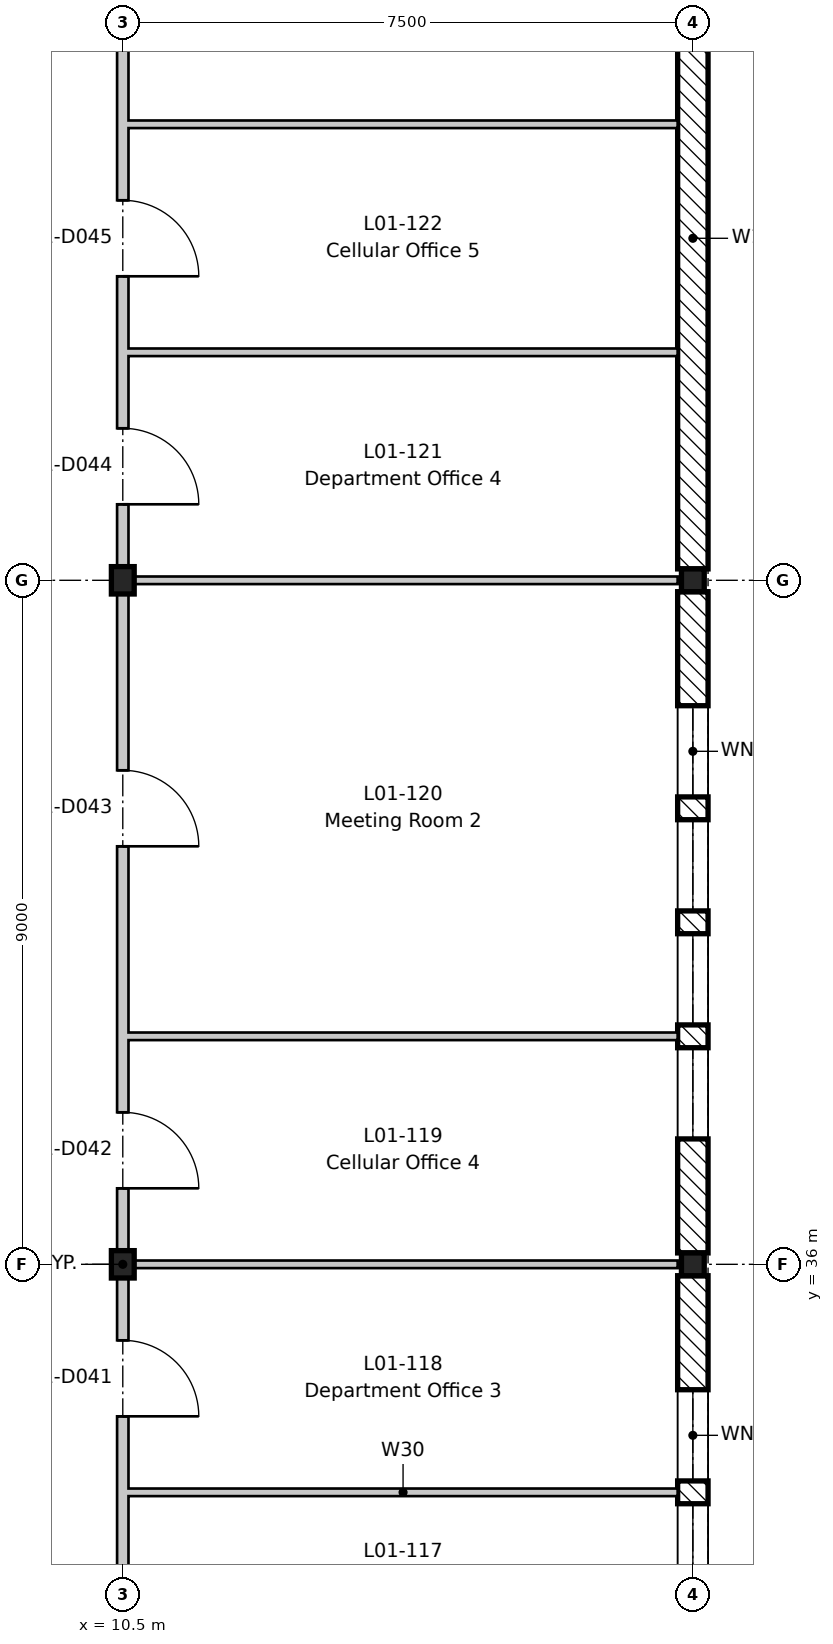
"""IFC4 building model, lengths in metres.
Left out: names, types, materials, properties, quantities, classifications, styles, units other than length and angle.
Written with IfcOpenShell. Run it as: python <this file> out.ifc"""

import sys

from ifc_helpers import new_model, si_unit, direction, frame, frame_2d, origin, origin_2d, place, context, subcontext, project, spatial, rectangle, i_section, extrude, element, fill, save


model = new_model("IFC4")
c1 = context("Model", 3, precision=1e-05, world=origin(), true_north=direction((0.0, 1.0)))
c2 = subcontext(c1, "Body", "Model", "MODEL_VIEW")
j1 = project(units=[si_unit("LENGTHUNIT", "METRE"), si_unit("PLANEANGLEUNIT", "RADIAN")], contexts=[c1])
p1 = place(None, origin())
s1 = spatial("IfcSite", under=j1, at=p1, CompositionType="ELEMENT")
p2 = place(p1, origin())
s2 = spatial("IfcBuilding", under=s1, at=p2, CompositionType="ELEMENT")
p3 = place(p2, frame((0.0, 0.0, 5.4)))
s3 = spatial("IfcBuildingStorey", under=s2, at=p3, CompositionType="ELEMENT", Elevation=5.4)
for number, where, z_axis, x_axis in (
    (1, (10.5, 36.0, -0.2), (0.0, 0.0, 1.0), (1.0, 0.0, 0.0)),
    (2, (10.5, 45.0, -0.2), (0.0, 0.0, 1.0), (1.0, 0.0, 0.0)),
):
    element("IfcColumn", number, at=place(p3, frame(where, z_axis=z_axis, x_axis=x_axis)), inside=s3, PredefinedType="COLUMN", context=c2, shape_type="SweptSolid", body=[
        extrude(i_section(OverallWidth=0.3, OverallDepth=0.36, WebThickness=0.012, FlangeThickness=0.022, FilletRadius=0.027, at=origin_2d()), origin(), (0.0, 0.0, 1.0), 4.5),
    ])
for number, where, z_axis, x_axis in (
    (3, (18.0, 36.0, -0.2), (0.0, 0.0, 1.0), (1.0, 0.0, 0.0)),
    (4, (18.0, 45.0, -0.2), (0.0, 0.0, 1.0), (1.0, 0.0, 0.0)),
):
    element("IfcColumn", number, at=place(p3, frame(where, z_axis=z_axis, x_axis=x_axis)), inside=s3, PredefinedType="COLUMN", context=c2, shape_type="SweptSolid", body=[
        extrude(i_section(OverallWidth=0.3, OverallDepth=0.3, WebThickness=0.011, FlangeThickness=0.019, FilletRadius=0.027, at=origin_2d()), origin(), (0.0, 0.0, 1.0), 4.5),
    ])
p4 = place(p3, frame((18.0, 35.85, 0.0), z_axis=(0.0, 0.0, 1.0), x_axis=(0.0, -1.0, 0.0)))
e5 = element("IfcWall", 5, at=p4, inside=s3, PredefinedType="STANDARD", context=c2, shape_type="SweptSolid", body=[
    extrude(rectangle(XDim=8.7, YDim=0.4, at=frame_2d((4.35, 0.0))), origin(), (0.0, 0.0, 1.0), 3.9),
])
p5 = place(p4, frame((6.0, 0.0, 0.6)))
e6 = element("IfcOpeningElement", 6, at=p5, cuts=e5, PredefinedType="OPENING", context=c2, shape_type="SweptSolid", body=[
    extrude(rectangle(XDim=1.2, YDim=3.0, at=frame_2d((0.6, 1.5))), frame((0.0, 0.21, 0.0), z_axis=(0.0, -1.0, 0.0), x_axis=(1.0, 0.0, 0.0)), (0.0, 0.0, 1.0), 0.42),
])
p6 = place(p4, frame((4.5, 0.0, 0.6)))
e7 = element("IfcOpeningElement", 7, at=p6, cuts=e5, PredefinedType="OPENING", context=c2, shape_type="SweptSolid", body=[
    extrude(rectangle(XDim=1.2, YDim=3.0, at=frame_2d((0.6, 1.5))), frame((0.0, 0.21, 0.0), z_axis=(0.0, -1.0, 0.0), x_axis=(1.0, 0.0, 0.0)), (0.0, 0.0, 1.0), 0.42),
])
p7 = place(p4, frame((3.0, 0.0, 0.6)))
e8 = element("IfcOpeningElement", 8, at=p7, cuts=e5, PredefinedType="OPENING", context=c2, shape_type="SweptSolid", body=[
    extrude(rectangle(XDim=1.2, YDim=3.0, at=frame_2d((0.6, 1.5))), frame((0.0, 0.21, 0.0), z_axis=(0.0, -1.0, 0.0), x_axis=(1.0, 0.0, 0.0)), (0.0, 0.0, 1.0), 0.42),
])
p8 = place(p4, frame((1.5, 0.0, 0.6)))
e9 = element("IfcOpeningElement", 9, at=p8, cuts=e5, PredefinedType="OPENING", context=c2, shape_type="SweptSolid", body=[
    extrude(rectangle(XDim=1.2, YDim=3.0, at=frame_2d((0.6, 1.5))), frame((0.0, 0.21, 0.0), z_axis=(0.0, -1.0, 0.0), x_axis=(1.0, 0.0, 0.0)), (0.0, 0.0, 1.0), 0.42),
])
p9 = place(p3, frame((18.0, 44.85, 0.0), z_axis=(0.0, 0.0, 1.0), x_axis=(0.0, -1.0, 0.0)))
e10 = element("IfcWall", 10, at=p9, inside=s3, PredefinedType="STANDARD", context=c2, shape_type="SweptSolid", body=[
    extrude(rectangle(XDim=8.7, YDim=0.4, at=frame_2d((4.35, 0.0))), origin(), (0.0, 0.0, 1.0), 3.9),
])
p10 = place(p9, frame((6.0, 0.0, 0.6)))
e11 = element("IfcOpeningElement", 11, at=p10, cuts=e10, PredefinedType="OPENING", context=c2, shape_type="SweptSolid", body=[
    extrude(rectangle(XDim=1.2, YDim=3.0, at=frame_2d((0.6, 1.5))), frame((0.0, 0.21, 0.0), z_axis=(0.0, -1.0, 0.0), x_axis=(1.0, 0.0, 0.0)), (0.0, 0.0, 1.0), 0.42),
])
p11 = place(p9, frame((4.5, 0.0, 0.6)))
e12 = element("IfcOpeningElement", 12, at=p11, cuts=e10, PredefinedType="OPENING", context=c2, shape_type="SweptSolid", body=[
    extrude(rectangle(XDim=1.2, YDim=3.0, at=frame_2d((0.6, 1.5))), frame((0.0, 0.21, 0.0), z_axis=(0.0, -1.0, 0.0), x_axis=(1.0, 0.0, 0.0)), (0.0, 0.0, 1.0), 0.42),
])
p12 = place(p9, frame((3.0, 0.0, 0.6)))
e13 = element("IfcOpeningElement", 13, at=p12, cuts=e10, PredefinedType="OPENING", context=c2, shape_type="SweptSolid", body=[
    extrude(rectangle(XDim=1.2, YDim=3.0, at=frame_2d((0.6, 1.5))), frame((0.0, 0.21, 0.0), z_axis=(0.0, -1.0, 0.0), x_axis=(1.0, 0.0, 0.0)), (0.0, 0.0, 1.0), 0.42),
])
p13 = place(p9, frame((1.5, 0.0, 0.6)))
e14 = element("IfcOpeningElement", 14, at=p13, cuts=e10, PredefinedType="OPENING", context=c2, shape_type="SweptSolid", body=[
    extrude(rectangle(XDim=1.2, YDim=3.0, at=frame_2d((0.6, 1.5))), frame((0.0, 0.21, 0.0), z_axis=(0.0, -1.0, 0.0), x_axis=(1.0, 0.0, 0.0)), (0.0, 0.0, 1.0), 0.42),
])
p14 = place(p3, frame((18.0, 53.85, 0.0), z_axis=(0.0, 0.0, 1.0), x_axis=(0.0, -1.0, 0.0)))
e15 = element("IfcWall", 15, at=p14, inside=s3, PredefinedType="STANDARD", context=c2, shape_type="SweptSolid", body=[
    extrude(rectangle(XDim=8.7, YDim=0.4, at=frame_2d((4.35, 0.0))), origin(), (0.0, 0.0, 1.0), 3.9),
])
p15 = place(p3, frame((10.575, 33.0, 0.0), z_axis=(0.0, 0.0, 1.0), x_axis=(1.0, 0.0, 0.0)))
e16 = element("IfcWall", 16, at=p15, inside=s3, PredefinedType="PARTITIONING", context=c2, shape_type="SweptSolid", body=[
    extrude(rectangle(XDim=7.225, YDim=0.1, at=frame_2d((3.613, 0.0))), origin(), (0.0, 0.0, 1.0), 4.3),
])
p16 = place(p3, frame((10.575, 36.0, 0.0), z_axis=(0.0, 0.0, 1.0), x_axis=(1.0, 0.0, 0.0)))
e17 = element("IfcWall", 17, at=p16, inside=s3, PredefinedType="PARTITIONING", context=c2, shape_type="SweptSolid", body=[
    extrude(rectangle(XDim=7.225, YDim=0.1, at=frame_2d((3.613, 0.0))), origin(), (0.0, 0.0, 1.0), 3.95),
])
p17 = place(p3, frame((10.575, 39.0, 0.0), z_axis=(0.0, 0.0, 1.0), x_axis=(1.0, 0.0, 0.0)))
e18 = element("IfcWall", 18, at=p17, inside=s3, PredefinedType="PARTITIONING", context=c2, shape_type="SweptSolid", body=[
    extrude(rectangle(XDim=7.225, YDim=0.1, at=frame_2d((3.613, 0.0))), origin(), (0.0, 0.0, 1.0), 4.3),
])
p18 = place(p3, frame((10.575, 45.0, 0.0), z_axis=(0.0, 0.0, 1.0), x_axis=(1.0, 0.0, 0.0)))
e19 = element("IfcWall", 19, at=p18, inside=s3, PredefinedType="PARTITIONING", context=c2, shape_type="SweptSolid", body=[
    extrude(rectangle(XDim=7.225, YDim=0.1, at=frame_2d((3.613, 0.0))), origin(), (0.0, 0.0, 1.0), 3.95),
])
for number, where, z_axis, x_axis in (
    (20, (10.575, 48.0, 0.0), (0.0, 0.0, 1.0), (1.0, 0.0, 0.0)),
    (21, (10.575, 51.0, 0.0), (0.0, 0.0, 1.0), (1.0, 0.0, 0.0)),
):
    element("IfcWall", number, at=place(p3, frame(where, z_axis=z_axis, x_axis=x_axis)), inside=s3, PredefinedType="PARTITIONING", context=c2, shape_type="SweptSolid", body=[
        extrude(rectangle(XDim=7.225, YDim=0.1, at=frame_2d((3.613, 0.0))), origin(), (0.0, 0.0, 1.0), 4.3),
    ])
p19 = place(p3, frame((10.5, -8.8, 0.0), z_axis=(0.0, 0.0, 1.0), x_axis=(0.0, 1.0, 0.0)))
e22 = element("IfcWall", 22, at=p19, inside=s3, PredefinedType="PARTITIONING", context=c2, shape_type="SweptSolid", body=[
    extrude(rectangle(XDim=79.3, YDim=0.15, at=frame_2d((39.65, 0.0))), origin(), (0.0, 0.0, 1.0), 3.78),
])
p20 = place(p19, frame((0.8, 0.0, 0.0)))
e23 = element("IfcOpeningElement", 23, at=p20, cuts=e22, PredefinedType="OPENING", context=c2, shape_type="SweptSolid", body=[
    extrude(rectangle(XDim=1.0, YDim=2.1, at=frame_2d((0.5, 1.05))), frame((0.0, 0.085, 0.0), z_axis=(0.0, -1.0, 0.0), x_axis=(1.0, 0.0, 0.0)), (0.0, 0.0, 1.0), 0.17),
])
p21 = place(p19, frame((5.3, 0.0, 0.0)))
e24 = element("IfcOpeningElement", 24, at=p21, cuts=e22, PredefinedType="OPENING", context=c2, shape_type="SweptSolid", body=[
    extrude(rectangle(XDim=1.0, YDim=2.1, at=frame_2d((0.5, 1.05))), frame((0.0, 0.085, 0.0), z_axis=(0.0, -1.0, 0.0), x_axis=(1.0, 0.0, 0.0)), (0.0, 0.0, 1.0), 0.17),
])
p22 = place(p19, frame((11.3, 0.0, 0.0)))
e25 = element("IfcOpeningElement", 25, at=p22, cuts=e22, PredefinedType="OPENING", context=c2, shape_type="SweptSolid", body=[
    extrude(rectangle(XDim=1.0, YDim=2.1, at=frame_2d((0.5, 1.05))), frame((0.0, 0.085, 0.0), z_axis=(0.0, -1.0, 0.0), x_axis=(1.0, 0.0, 0.0)), (0.0, 0.0, 1.0), 0.17),
])
p23 = place(p19, frame((15.8, 0.0, 0.0)))
e26 = element("IfcOpeningElement", 26, at=p23, cuts=e22, PredefinedType="OPENING", context=c2, shape_type="SweptSolid", body=[
    extrude(rectangle(XDim=1.0, YDim=2.1, at=frame_2d((0.5, 1.05))), frame((0.0, 0.085, 0.0), z_axis=(0.0, -1.0, 0.0), x_axis=(1.0, 0.0, 0.0)), (0.0, 0.0, 1.0), 0.17),
])
p24 = place(p19, frame((18.8, 0.0, 0.0)))
e27 = element("IfcOpeningElement", 27, at=p24, cuts=e22, PredefinedType="OPENING", context=c2, shape_type="SweptSolid", body=[
    extrude(rectangle(XDim=1.0, YDim=2.1, at=frame_2d((0.5, 1.05))), frame((0.0, 0.085, 0.0), z_axis=(0.0, -1.0, 0.0), x_axis=(1.0, 0.0, 0.0)), (0.0, 0.0, 1.0), 0.17),
])
p25 = place(p19, frame((23.3, 0.0, 0.0)))
e28 = element("IfcOpeningElement", 28, at=p25, cuts=e22, PredefinedType="OPENING", context=c2, shape_type="SweptSolid", body=[
    extrude(rectangle(XDim=1.0, YDim=2.1, at=frame_2d((0.5, 1.05))), frame((0.0, 0.085, 0.0), z_axis=(0.0, -1.0, 0.0), x_axis=(1.0, 0.0, 0.0)), (0.0, 0.0, 1.0), 0.17),
])
p26 = place(p19, frame((29.3, 0.0, 0.0)))
e29 = element("IfcOpeningElement", 29, at=p26, cuts=e22, PredefinedType="OPENING", context=c2, shape_type="SweptSolid", body=[
    extrude(rectangle(XDim=1.0, YDim=2.1, at=frame_2d((0.5, 1.05))), frame((0.0, 0.085, 0.0), z_axis=(0.0, -1.0, 0.0), x_axis=(1.0, 0.0, 0.0)), (0.0, 0.0, 1.0), 0.17),
])
p27 = place(p19, frame((33.8, 0.0, 0.0)))
e30 = element("IfcOpeningElement", 30, at=p27, cuts=e22, PredefinedType="OPENING", context=c2, shape_type="SweptSolid", body=[
    extrude(rectangle(XDim=1.0, YDim=2.1, at=frame_2d((0.5, 1.05))), frame((0.0, 0.085, 0.0), z_axis=(0.0, -1.0, 0.0), x_axis=(1.0, 0.0, 0.0)), (0.0, 0.0, 1.0), 0.17),
])
p28 = place(p19, frame((38.3, 0.0, 0.0)))
e31 = element("IfcOpeningElement", 31, at=p28, cuts=e22, PredefinedType="OPENING", context=c2, shape_type="SweptSolid", body=[
    extrude(rectangle(XDim=1.0, YDim=2.1, at=frame_2d((0.5, 1.05))), frame((0.0, 0.085, 0.0), z_axis=(0.0, -1.0, 0.0), x_axis=(1.0, 0.0, 0.0)), (0.0, 0.0, 1.0), 0.17),
])
p29 = place(p19, frame((42.8, 0.0, 0.0)))
e32 = element("IfcOpeningElement", 32, at=p29, cuts=e22, PredefinedType="OPENING", context=c2, shape_type="SweptSolid", body=[
    extrude(rectangle(XDim=1.0, YDim=2.1, at=frame_2d((0.5, 1.05))), frame((0.0, 0.085, 0.0), z_axis=(0.0, -1.0, 0.0), x_axis=(1.0, 0.0, 0.0)), (0.0, 0.0, 1.0), 0.17),
])
p30 = place(p19, frame((45.8, 0.0, 0.0)))
e33 = element("IfcOpeningElement", 33, at=p30, cuts=e22, PredefinedType="OPENING", context=c2, shape_type="SweptSolid", body=[
    extrude(rectangle(XDim=1.0, YDim=2.1, at=frame_2d((0.5, 1.05))), frame((0.0, 0.085, 0.0), z_axis=(0.0, -1.0, 0.0), x_axis=(1.0, 0.0, 0.0)), (0.0, 0.0, 1.0), 0.17),
])
p31 = place(p19, frame((50.3, 0.0, 0.0)))
e34 = element("IfcOpeningElement", 34, at=p31, cuts=e22, PredefinedType="OPENING", context=c2, shape_type="SweptSolid", body=[
    extrude(rectangle(XDim=1.0, YDim=2.1, at=frame_2d((0.5, 1.05))), frame((0.0, 0.085, 0.0), z_axis=(0.0, -1.0, 0.0), x_axis=(1.0, 0.0, 0.0)), (0.0, 0.0, 1.0), 0.17),
])
p32 = place(p19, frame((54.8, 0.0, 0.0)))
e35 = element("IfcOpeningElement", 35, at=p32, cuts=e22, PredefinedType="OPENING", context=c2, shape_type="SweptSolid", body=[
    extrude(rectangle(XDim=1.0, YDim=2.1, at=frame_2d((0.5, 1.05))), frame((0.0, 0.085, 0.0), z_axis=(0.0, -1.0, 0.0), x_axis=(1.0, 0.0, 0.0)), (0.0, 0.0, 1.0), 0.17),
])
p33 = place(p19, frame((57.8, 0.0, 0.0)))
e36 = element("IfcOpeningElement", 36, at=p33, cuts=e22, PredefinedType="OPENING", context=c2, shape_type="SweptSolid", body=[
    extrude(rectangle(XDim=1.0, YDim=2.1, at=frame_2d((0.5, 1.05))), frame((0.0, 0.085, 0.0), z_axis=(0.0, -1.0, 0.0), x_axis=(1.0, 0.0, 0.0)), (0.0, 0.0, 1.0), 0.17),
])
p34 = place(p19, frame((63.6, 0.0, 0.0)))
e37 = element("IfcOpeningElement", 37, at=p34, cuts=e22, PredefinedType="OPENING", context=c2, shape_type="SweptSolid", body=[
    extrude(rectangle(XDim=1.4, YDim=2.1, at=frame_2d((0.7, 1.05))), frame((0.0, 0.085, 0.0), z_axis=(0.0, -1.0, 0.0), x_axis=(1.0, 0.0, 0.0)), (0.0, 0.0, 1.0), 0.17),
])
p35 = place(p19, frame((69.8, 0.0, 0.0)))
e38 = element("IfcOpeningElement", 38, at=p35, cuts=e22, PredefinedType="OPENING", context=c2, shape_type="SweptSolid", body=[
    extrude(rectangle(XDim=1.0, YDim=2.1, at=frame_2d((0.5, 1.05))), frame((0.0, 0.085, 0.0), z_axis=(0.0, -1.0, 0.0), x_axis=(1.0, 0.0, 0.0)), (0.0, 0.0, 1.0), 0.17),
])
p36 = place(p19, frame((72.8, 0.0, 0.0)))
e39 = element("IfcOpeningElement", 39, at=p36, cuts=e22, PredefinedType="OPENING", context=c2, shape_type="SweptSolid", body=[
    extrude(rectangle(XDim=1.0, YDim=2.1, at=frame_2d((0.5, 1.05))), frame((0.0, 0.085, 0.0), z_axis=(0.0, -1.0, 0.0), x_axis=(1.0, 0.0, 0.0)), (0.0, 0.0, 1.0), 0.17),
])
p37 = place(p7, origin())
e40 = element("IfcWindow", 40, at=p37, inside=s3, PartitioningType="SINGLE_PANEL", PredefinedType="WINDOW", context=c2, shape_type="SweptSolid", body=[
    extrude(rectangle(XDim=1.2, YDim=3.0, at=frame_2d((0.6, 1.5))), frame((0.0, 0.03, 0.0), z_axis=(0.0, -1.0, 0.0), x_axis=(1.0, 0.0, 0.0)), (0.0, 0.0, 1.0), 0.06),
])
fill(e8, e40)
p38 = place(p8, origin())
e41 = element("IfcWindow", 41, at=p38, inside=s3, PartitioningType="SINGLE_PANEL", PredefinedType="WINDOW", context=c2, shape_type="SweptSolid", body=[
    extrude(rectangle(XDim=1.2, YDim=3.0, at=frame_2d((0.6, 1.5))), frame((0.0, 0.03, 0.0), z_axis=(0.0, -1.0, 0.0), x_axis=(1.0, 0.0, 0.0)), (0.0, 0.0, 1.0), 0.06),
])
fill(e9, e41)
p39 = place(p10, origin())
e42 = element("IfcWindow", 42, at=p39, inside=s3, PartitioningType="SINGLE_PANEL", PredefinedType="WINDOW", context=c2, shape_type="SweptSolid", body=[
    extrude(rectangle(XDim=1.2, YDim=3.0, at=frame_2d((0.6, 1.5))), frame((0.0, 0.03, 0.0), z_axis=(0.0, -1.0, 0.0), x_axis=(1.0, 0.0, 0.0)), (0.0, 0.0, 1.0), 0.06),
])
fill(e11, e42)
p40 = place(p11, origin())
e43 = element("IfcWindow", 43, at=p40, inside=s3, PartitioningType="SINGLE_PANEL", PredefinedType="WINDOW", context=c2, shape_type="SweptSolid", body=[
    extrude(rectangle(XDim=1.2, YDim=3.0, at=frame_2d((0.6, 1.5))), frame((0.0, 0.03, 0.0), z_axis=(0.0, -1.0, 0.0), x_axis=(1.0, 0.0, 0.0)), (0.0, 0.0, 1.0), 0.06),
])
fill(e12, e43)
p41 = place(p12, origin())
e44 = element("IfcWindow", 44, at=p41, inside=s3, PartitioningType="SINGLE_PANEL", PredefinedType="WINDOW", context=c2, shape_type="SweptSolid", body=[
    extrude(rectangle(XDim=1.2, YDim=3.0, at=frame_2d((0.6, 1.5))), frame((0.0, 0.03, 0.0), z_axis=(0.0, -1.0, 0.0), x_axis=(1.0, 0.0, 0.0)), (0.0, 0.0, 1.0), 0.06),
])
fill(e13, e44)
p42 = place(p13, origin())
e45 = element("IfcWindow", 45, at=p42, inside=s3, PartitioningType="SINGLE_PANEL", PredefinedType="WINDOW", context=c2, shape_type="SweptSolid", body=[
    extrude(rectangle(XDim=1.2, YDim=3.0, at=frame_2d((0.6, 1.5))), frame((0.0, 0.03, 0.0), z_axis=(0.0, -1.0, 0.0), x_axis=(1.0, 0.0, 0.0)), (0.0, 0.0, 1.0), 0.06),
])
fill(e14, e45)
p43 = place(p29, frame((1.0, 0.0, 0.0), z_axis=(0.0, 0.0, 1.0), x_axis=(-1.0, 0.0, 0.0)))
e46 = element("IfcDoor", 46, at=p43, inside=s3, OperationType="SINGLE_SWING_RIGHT", PredefinedType="DOOR", context=c2, shape_type="SweptSolid", body=[
    extrude(rectangle(XDim=1.0, YDim=2.1, at=frame_2d((0.5, 1.05))), frame((0.0, 0.025, 0.0), z_axis=(0.0, -1.0, 0.0), x_axis=(1.0, 0.0, 0.0)), (0.0, 0.0, 1.0), 0.05),
])
fill(e32, e46)
p44 = place(p30, frame((1.0, 0.0, 0.0), z_axis=(0.0, 0.0, 1.0), x_axis=(-1.0, 0.0, 0.0)))
e47 = element("IfcDoor", 47, at=p44, inside=s3, OperationType="SINGLE_SWING_RIGHT", PredefinedType="DOOR", context=c2, shape_type="SweptSolid", body=[
    extrude(rectangle(XDim=1.0, YDim=2.1, at=frame_2d((0.5, 1.05))), frame((0.0, 0.025, 0.0), z_axis=(0.0, -1.0, 0.0), x_axis=(1.0, 0.0, 0.0)), (0.0, 0.0, 1.0), 0.05),
])
fill(e33, e47)
p45 = place(p31, frame((1.0, 0.0, 0.0), z_axis=(0.0, 0.0, 1.0), x_axis=(-1.0, 0.0, 0.0)))
e48 = element("IfcDoor", 48, at=p45, inside=s3, OperationType="SINGLE_SWING_RIGHT", PredefinedType="DOOR", context=c2, shape_type="SweptSolid", body=[
    extrude(rectangle(XDim=1.0, YDim=2.1, at=frame_2d((0.5, 1.05))), frame((0.0, 0.025, 0.0), z_axis=(0.0, -1.0, 0.0), x_axis=(1.0, 0.0, 0.0)), (0.0, 0.0, 1.0), 0.05),
])
fill(e34, e48)
p46 = place(p32, frame((1.0, 0.0, 0.0), z_axis=(0.0, 0.0, 1.0), x_axis=(-1.0, 0.0, 0.0)))
e49 = element("IfcDoor", 49, at=p46, inside=s3, OperationType="SINGLE_SWING_RIGHT", PredefinedType="DOOR", context=c2, shape_type="SweptSolid", body=[
    extrude(rectangle(XDim=1.0, YDim=2.1, at=frame_2d((0.5, 1.05))), frame((0.0, 0.025, 0.0), z_axis=(0.0, -1.0, 0.0), x_axis=(1.0, 0.0, 0.0)), (0.0, 0.0, 1.0), 0.05),
])
fill(e35, e49)
p47 = place(p33, frame((1.0, 0.0, 0.0), z_axis=(0.0, 0.0, 1.0), x_axis=(-1.0, 0.0, 0.0)))
e50 = element("IfcDoor", 50, at=p47, inside=s3, OperationType="SINGLE_SWING_RIGHT", PredefinedType="DOOR", context=c2, shape_type="SweptSolid", body=[
    extrude(rectangle(XDim=1.0, YDim=2.1, at=frame_2d((0.5, 1.05))), frame((0.0, 0.025, 0.0), z_axis=(0.0, -1.0, 0.0), x_axis=(1.0, 0.0, 0.0)), (0.0, 0.0, 1.0), 0.05),
])
fill(e36, e50)
save(model, sys.argv[1])
